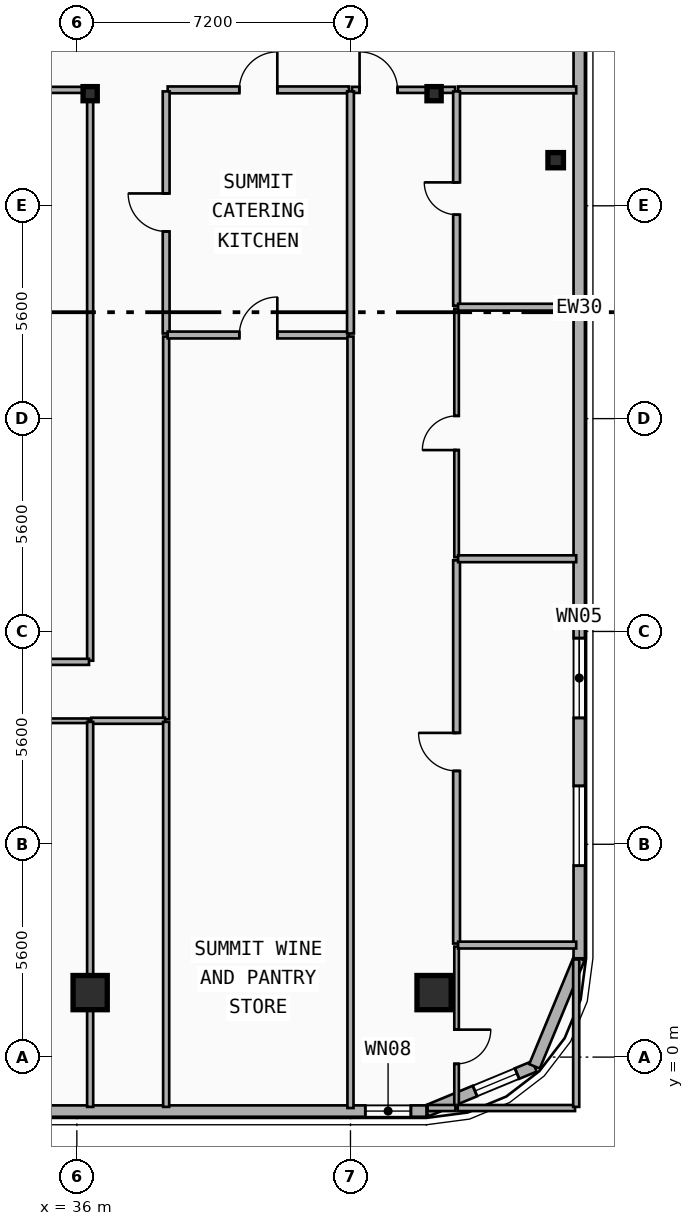
"""IFC4 building model, lengths in metres.
Left out: names, types, materials, properties, quantities, classifications, styles, units other than length and angle.
Written with IfcOpenShell. Run it as: python <this file> out.ifc"""

import sys

from ifc_helpers import new_model, si_unit, direction, frame, frame_2d, origin, origin_2d, place, context, subcontext, project, spatial, rectangle, i_section, extrude, element, fill, save


model = new_model("IFC4")
c1 = context("Model", 3, precision=1e-05, world=origin(), true_north=direction((0.0, 1.0)))
c2 = subcontext(c1, "Body", "Model", "MODEL_VIEW")
j1 = project(units=[si_unit("LENGTHUNIT", "METRE"), si_unit("PLANEANGLEUNIT", "RADIAN")], contexts=[c1])
p1 = place(None, origin())
s1 = spatial("IfcSite", under=j1, at=p1, CompositionType="ELEMENT")
p2 = place(p1, origin())
s2 = spatial("IfcBuilding", under=s1, at=p2, CompositionType="ELEMENT")
p3 = place(p2, frame((0.0, 0.0, 269.5)))
s3 = spatial("IfcBuildingStorey", under=s2, at=p3, CompositionType="ELEMENT", Elevation=269.5)
for number, where, z_axis, x_axis in (
    (1, (36.35, 25.35, 0.0), (0.0, 0.0, 1.0), (1.0, 0.0, 0.0)),
    (2, (45.4, 25.35, 0.0), (0.0, 0.0, 1.0), (1.0, 0.0, 0.0)),
):
    element("IfcColumn", number, at=place(p3, frame(where, z_axis=z_axis, x_axis=x_axis)), inside=s3, PredefinedType="COLUMN", context=c2, shape_type="SweptSolid", body=[
        extrude(i_section(OverallWidth=0.374, OverallDepth=0.372, WebThickness=0.017, FlangeThickness=0.027, FilletRadius=0.015, at=origin_2d()), origin(), (0.0, 0.0, 1.0), 3.7),
    ])
for number, where, z_axis, x_axis in (
    (3, (36.35, 1.806, 0.0), (0.0, -0.09, 0.996), (1.0, 0.0, 0.0)),
    (4, (45.4, 1.806, 0.0), (0.0, -0.09, 0.996), (1.0, 0.0, 0.0)),
):
    element("IfcColumn", number, at=place(p3, frame(where, z_axis=z_axis, x_axis=x_axis)), inside=s3, PredefinedType="COLUMN", context=c2, shape_type="SweptSolid", body=[
        extrude(rectangle(XDim=0.9, YDim=0.9, at=origin_2d()), origin(), (0.0, 0.0, 1.0), 3.715),
    ])
p4 = place(p3, frame((48.6, 23.6, 0.0), z_axis=(0.0, 0.0, 1.0), x_axis=(1.0, 0.0, 0.0)))
e5 = element("IfcColumn", 5, at=p4, inside=s3, PredefinedType="COLUMN", context=c2, shape_type="SweptSolid", body=[
    extrude(i_section(OverallWidth=0.408, OverallDepth=0.4, WebThickness=0.025, FlangeThickness=0.039, FilletRadius=0.015, at=origin_2d()), origin(), (0.0, 0.0, 1.0), 3.7),
])
p5 = place(p3, frame((48.042, -0.243, 0.0), z_axis=(0.0, 0.0, 1.0), x_axis=(-0.92389884758, -0.382636798336, 0.0)))
e6 = element("IfcWall", 6, at=p5, inside=s3, PredefinedType="SOLIDWALL", context=c2, shape_type="SweptSolid", body=[
    extrude(rectangle(XDim=3.077, YDim=0.3, at=frame_2d((1.538, 0.0))), origin(), (0.0, 0.0, 1.0), 3.42),
])
p6 = place(p5, frame((0.497, 0.0, 0.75)))
e7 = element("IfcOpeningElement", 7, at=p6, cuts=e6, PredefinedType="OPENING", context=c2, shape_type="SweptSolid", body=[
    extrude(rectangle(XDim=1.2, YDim=1.5, at=frame_2d((0.6, 0.75))), frame((0.0, 0.16, 0.0), z_axis=(0.0, -1.0, 0.0), x_axis=(1.0, 0.0, 0.0)), (0.0, 0.0, 1.0), 0.32),
])
p7 = place(p3, frame((49.22, 2.6, 0.0), z_axis=(0.0, 0.0, 1.0), x_axis=(-0.382676475685, -0.923882414032, 0.0)))
e8 = element("IfcWall", 8, at=p7, inside=s3, PredefinedType="SOLIDWALL", context=c2, shape_type="SweptSolid", body=[
    extrude(rectangle(XDim=3.077, YDim=0.3, at=frame_2d((1.539, 0.0))), origin(), (0.0, 0.0, 1.0), 3.42),
])
p8 = place(p3, frame((49.22, 36.8, 0.0), z_axis=(0.0, 0.0, 1.0), x_axis=(0.0, -1.0, 0.0)))
e9 = element("IfcWall", 9, at=p8, inside=s3, PredefinedType="SOLIDWALL", context=c2, shape_type="SweptSolid", body=[
    extrude(rectangle(XDim=34.2, YDim=0.3, at=frame_2d((17.1, 0.0))), origin(), (0.0, 0.0, 1.0), 3.42),
])
p9 = place(p8, frame((25.775, 0.0, 0.75)))
e10 = element("IfcOpeningElement", 10, at=p9, cuts=e9, PredefinedType="OPENING", context=c2, shape_type="SweptSolid", body=[
    extrude(rectangle(XDim=2.1, YDim=2.1, at=frame_2d((1.05, 1.05))), frame((0.0, 0.16, 0.0), z_axis=(0.0, -1.0, 0.0), x_axis=(1.0, 0.0, 0.0)), (0.0, 0.0, 1.0), 0.32),
])
p10 = place(p8, frame((29.664, 0.0, 0.75)))
e11 = element("IfcOpeningElement", 11, at=p10, cuts=e9, PredefinedType="OPENING", context=c2, shape_type="SweptSolid", body=[
    extrude(rectangle(XDim=2.1, YDim=2.1, at=frame_2d((1.05, 1.05))), frame((0.0, 0.16, 0.0), z_axis=(0.0, -1.0, 0.0), x_axis=(1.0, 0.0, 0.0)), (0.0, 0.0, 1.0), 0.32),
])
p11 = place(p3, frame((45.2, -1.42, 0.0), z_axis=(0.0, 0.0, 1.0), x_axis=(-1.0, 0.0, 0.0)))
e12 = element("IfcWall", 12, at=p11, inside=s3, PredefinedType="SOLIDWALL", context=c2, shape_type="SweptSolid", body=[
    extrude(rectangle(XDim=32.8, YDim=0.3, at=frame_2d((16.4, 0.0))), origin(), (0.0, 0.0, 1.0), 3.42),
])
p12 = place(p11, frame((27.919, 0.0, 0.75)))
e13 = element("IfcOpeningElement", 13, at=p12, cuts=e12, PredefinedType="OPENING", context=c2, shape_type="SweptSolid", body=[
    extrude(rectangle(XDim=2.1, YDim=2.1, at=frame_2d((1.05, 1.05))), frame((0.0, 0.16, 0.0), z_axis=(0.0, -1.0, 0.0), x_axis=(1.0, 0.0, 0.0)), (0.0, 0.0, 1.0), 0.32),
])
p13 = place(p11, frame((15.75, 0.0, 0.75)))
e14 = element("IfcOpeningElement", 14, at=p13, cuts=e12, PredefinedType="OPENING", context=c2, shape_type="SweptSolid", body=[
    extrude(rectangle(XDim=2.1, YDim=2.1, at=frame_2d((1.05, 1.05))), frame((0.0, 0.16, 0.0), z_axis=(0.0, -1.0, 0.0), x_axis=(1.0, 0.0, 0.0)), (0.0, 0.0, 1.0), 0.32),
])
p14 = place(p11, frame((0.41, 0.0, 0.68)))
e15 = element("IfcOpeningElement", 15, at=p14, cuts=e12, PredefinedType="OPENING", context=c2, shape_type="SweptSolid", body=[
    extrude(rectangle(XDim=1.2, YDim=1.5, at=frame_2d((0.6, 0.75))), frame((0.0, 0.16, 0.0), z_axis=(0.0, -1.0, 0.0), x_axis=(1.0, 0.0, 0.0)), (0.0, 0.0, 1.0), 0.32),
])
p15 = place(p3, frame((38.39, 25.45, 0.0), z_axis=(0.0, 0.0, 1.0), x_axis=(1.0, 0.0, 0.0)))
e16 = element("IfcWall", 16, at=p15, inside=s3, PredefinedType="PLUMBINGWALL", context=c2, shape_type="SweptSolid", body=[
    extrude(rectangle(XDim=4.77, YDim=0.18, at=frame_2d((2.385, 0.0))), origin(), (0.0, 0.0, 1.0), 3.42),
])
p16 = place(p15, frame((1.885, 0.0, 0.0)))
e17 = element("IfcOpeningElement", 17, at=p16, cuts=e16, PredefinedType="OPENING", context=c2, shape_type="SweptSolid", body=[
    extrude(rectangle(XDim=1.0, YDim=2.15, at=frame_2d((0.5, 1.075))), frame((0.0, 0.1, 0.0), z_axis=(0.0, -1.0, 0.0), x_axis=(1.0, 0.0, 0.0)), (0.0, 0.0, 1.0), 0.2),
])
p17 = place(p3, frame((43.24, 25.45, 0.0), z_axis=(0.0, 0.0, 1.0), x_axis=(1.0, 0.0, 0.0)))
e18 = element("IfcWall", 18, at=p17, inside=s3, PredefinedType="PARTITIONING", context=c2, shape_type="SweptSolid", body=[
    extrude(rectangle(XDim=2.712, YDim=0.16, at=frame_2d((1.356, 0.0))), origin(), (0.0, 0.0, 1.0), 2.7),
])
p18 = place(p17, frame((0.2, 0.0, 0.0)))
e19 = element("IfcOpeningElement", 19, at=p18, cuts=e18, PredefinedType="OPENING", context=c2, shape_type="SweptSolid", body=[
    extrude(rectangle(XDim=1.0, YDim=2.15, at=frame_2d((0.5, 1.075))), frame((0.0, 0.09, 0.0), z_axis=(0.0, -1.0, 0.0), x_axis=(1.0, 0.0, 0.0)), (0.0, 0.0, 1.0), 0.18),
])
p19 = place(p3, frame((46.032, 25.45, 0.0), z_axis=(0.0, 0.0, 1.0), x_axis=(1.0, 0.0, 0.0)))
e20 = element("IfcWall", 20, at=p19, inside=s3, PredefinedType="PLUMBINGWALL", context=c2, shape_type="SweptSolid", body=[
    extrude(rectangle(XDim=3.108, YDim=0.18, at=frame_2d((1.554, 0.0))), origin(), (0.0, 0.0, 1.0), 3.42),
])
p20 = place(p3, frame((38.35, 19.04, 0.0), z_axis=(0.0, 0.0, 1.0), x_axis=(0.0, 1.0, 0.0)))
e21 = element("IfcWall", 21, at=p20, inside=s3, PredefinedType="PLUMBINGWALL", context=c2, shape_type="SweptSolid", body=[
    extrude(rectangle(XDim=6.37, YDim=0.18, at=frame_2d((3.185, 0.0))), origin(), (0.0, 0.0, 1.0), 2.96),
])
p21 = place(p20, frame((2.685, 0.0, 0.0)))
e22 = element("IfcOpeningElement", 22, at=p21, cuts=e21, PredefinedType="OPENING", context=c2, shape_type="SweptSolid", body=[
    extrude(rectangle(XDim=1.0, YDim=2.15, at=frame_2d((0.5, 1.075))), frame((0.0, 0.1, 0.0), z_axis=(0.0, -1.0, 0.0), x_axis=(1.0, 0.0, 0.0)), (0.0, 0.0, 1.0), 0.2),
])
p22 = place(p3, frame((38.35, 8.89, 0.0), z_axis=(0.0, 0.0, 1.0), x_axis=(0.0, 1.0, 0.0)))
e23 = element("IfcWall", 23, at=p22, inside=s3, PredefinedType="PARTITIONING", context=c2, shape_type="SweptSolid", body=[
    extrude(rectangle(XDim=10.07, YDim=0.16, at=frame_2d((5.035, 0.0))), origin(), (0.0, 0.0, 1.0), 2.96),
])
p23 = place(p3, frame((20.49, 8.85, 0.0), z_axis=(0.0, 0.0, 1.0), x_axis=(1.0, 0.0, 0.0)))
e24 = element("IfcWall", 24, at=p23, inside=s3, PredefinedType="PARTITIONING", context=c2, shape_type="SweptSolid", body=[
    extrude(rectangle(XDim=15.82, YDim=0.12, at=frame_2d((7.91, 0.0))), origin(), (0.0, 0.0, 1.0), 2.7),
])
p24 = place(p23, frame((7.46, 0.0, 0.0)))
e25 = element("IfcOpeningElement", 25, at=p24, cuts=e24, PredefinedType="OPENING", context=c2, shape_type="SweptSolid", body=[
    extrude(rectangle(XDim=0.9, YDim=2.1, at=frame_2d((0.45, 1.05))), frame((0.0, 0.07, 0.0), z_axis=(0.0, -1.0, 0.0), x_axis=(1.0, 0.0, 0.0)), (0.0, 0.0, 1.0), 0.14),
])
p25 = place(p3, frame((38.39, 19.0, 0.0), z_axis=(0.0, 0.0, 1.0), x_axis=(1.0, 0.0, 0.0)))
e26 = element("IfcWall", 26, at=p25, inside=s3, PredefinedType="PLUMBINGWALL", context=c2, shape_type="SweptSolid", body=[
    extrude(rectangle(XDim=4.77, YDim=0.18, at=frame_2d((2.385, 0.0))), origin(), (0.0, 0.0, 1.0), 3.09),
])
p26 = place(p25, frame((1.885, 0.0, 0.0)))
e27 = element("IfcOpeningElement", 27, at=p26, cuts=e26, PredefinedType="OPENING", context=c2, shape_type="SweptSolid", body=[
    extrude(rectangle(XDim=1.0, YDim=2.15, at=frame_2d((0.5, 1.075))), frame((0.0, 0.1, 0.0), z_axis=(0.0, -1.0, 0.0), x_axis=(1.0, 0.0, 0.0)), (0.0, 0.0, 1.0), 0.2),
])
p27 = place(p3, frame((43.2, 19.04, 0.0), z_axis=(0.0, 0.0, 1.0), x_axis=(0.0, 1.0, 0.0)))
e28 = element("IfcWall", 28, at=p27, inside=s3, PredefinedType="PLUMBINGWALL", context=c2, shape_type="SweptSolid", body=[
    extrude(rectangle(XDim=6.37, YDim=0.18, at=frame_2d((3.185, 0.0))), origin(), (0.0, 0.0, 1.0), 2.96),
])
p28 = place(p3, frame((43.2, -1.34, 0.0), z_axis=(0.0, 0.0, 1.0), x_axis=(0.0, 1.0, 0.0)))
e29 = element("IfcWall", 29, at=p28, inside=s3, PredefinedType="PARTITIONING", context=c2, shape_type="SweptSolid", body=[
    extrude(rectangle(XDim=20.3, YDim=0.16, at=frame_2d((10.15, 0.0))), origin(), (0.0, 0.0, 1.0), 2.96),
])
p29 = place(p3, frame((45.992, 2.908, 0.0), z_axis=(0.0, 0.0, 1.0), x_axis=(0.0, -1.0, 0.0)))
e30 = element("IfcWall", 30, at=p29, inside=s3, PredefinedType="PARTITIONING", context=c2, shape_type="SweptSolid", body=[
    extrude(rectangle(XDim=4.248, YDim=0.12, at=frame_2d((2.124, 0.0))), origin(), (0.0, 0.0, 1.0), 2.7),
])
p30 = place(p29, frame((2.185, 0.0, 0.0)))
e31 = element("IfcOpeningElement", 31, at=p30, cuts=e30, PredefinedType="OPENING", context=c2, shape_type="SweptSolid", body=[
    extrude(rectangle(XDim=0.9, YDim=2.1, at=frame_2d((0.45, 1.05))), frame((0.0, 0.07, 0.0), z_axis=(0.0, -1.0, 0.0), x_axis=(1.0, 0.0, 0.0)), (0.0, 0.0, 1.0), 0.14),
])
p31 = place(p3, frame((45.992, 2.988, 0.0), z_axis=(0.0, 0.0, 1.0), x_axis=(0.0, 1.0, 0.0)))
e32 = element("IfcWall", 32, at=p31, inside=s3, PredefinedType="PLUMBINGWALL", context=c2, shape_type="SweptSolid", body=[
    extrude(rectangle(XDim=10.085, YDim=0.18, at=frame_2d((5.042, 0.0))), origin(), (0.0, 0.0, 1.0), 2.7),
])
p32 = place(p31, frame((4.542, 0.0, 0.0)))
e33 = element("IfcOpeningElement", 33, at=p32, cuts=e32, PredefinedType="OPENING", context=c2, shape_type="SweptSolid", body=[
    extrude(rectangle(XDim=1.0, YDim=2.15, at=frame_2d((0.5, 1.075))), frame((0.0, 0.1, 0.0), z_axis=(0.0, -1.0, 0.0), x_axis=(1.0, 0.0, 0.0)), (0.0, 0.0, 1.0), 0.2),
])
p33 = place(p3, frame((45.992, 13.153, 0.0), z_axis=(0.0, 0.0, 1.0), x_axis=(0.0, 1.0, 0.0)))
e34 = element("IfcWall", 34, at=p33, inside=s3, PredefinedType="PARTITIONING", context=c2, shape_type="SweptSolid", body=[
    extrude(rectangle(XDim=6.539, YDim=0.12, at=frame_2d((3.27, 0.0))), origin(), (0.0, 0.0, 1.0), 2.7),
])
p34 = place(p33, frame((2.82, 0.0, 0.0)))
e35 = element("IfcOpeningElement", 35, at=p34, cuts=e34, PredefinedType="OPENING", context=c2, shape_type="SweptSolid", body=[
    extrude(rectangle(XDim=0.9, YDim=2.1, at=frame_2d((0.45, 1.05))), frame((0.0, 0.07, 0.0), z_axis=(0.0, -1.0, 0.0), x_axis=(1.0, 0.0, 0.0)), (0.0, 0.0, 1.0), 0.14),
])
p35 = place(p3, frame((45.992, 19.772, 0.0), z_axis=(0.0, 0.0, 1.0), x_axis=(0.0, 1.0, 0.0)))
e36 = element("IfcWall", 36, at=p35, inside=s3, PredefinedType="PLUMBINGWALL", context=c2, shape_type="SweptSolid", body=[
    extrude(rectangle(XDim=5.638, YDim=0.18, at=frame_2d((2.819, 0.0))), origin(), (0.0, 0.0, 1.0), 2.7),
])
p36 = place(p35, frame((2.394, 0.0, 0.0)))
e37 = element("IfcOpeningElement", 37, at=p36, cuts=e36, PredefinedType="OPENING", context=c2, shape_type="SweptSolid", body=[
    extrude(rectangle(XDim=0.85, YDim=2.1, at=frame_2d((0.425, 1.05))), frame((0.0, 0.1, 0.0), z_axis=(0.0, -1.0, 0.0), x_axis=(1.0, 0.0, 0.0)), (0.0, 0.0, 1.0), 0.2),
])
for number, where, z_axis, x_axis in (
    (38, (46.032, 2.948, 0.0), (0.0, 0.0, 1.0), (1.0, 0.0, 0.0)),
    (39, (46.032, 13.113, 0.0), (0.0, 0.0, 1.0), (1.0, 0.0, 0.0)),
    (40, (46.032, 19.732, 0.0), (0.0, 0.0, 1.0), (1.0, 0.0, 0.0)),
):
    element("IfcWall", number, at=place(p3, frame(where, z_axis=z_axis, x_axis=x_axis)), inside=s3, PredefinedType="PLUMBINGWALL", context=c2, shape_type="SweptSolid", body=[
        extrude(rectangle(XDim=3.108, YDim=0.18, at=frame_2d((1.554, 0.0))), origin(), (0.0, 0.0, 1.0), 3.42),
    ])
p37 = place(p3, frame((20.48, 25.45, 0.0), z_axis=(0.0, 0.0, 1.0), x_axis=(1.0, 0.0, 0.0)))
e41 = element("IfcWall", 41, at=p37, inside=s3, PredefinedType="PARTITIONING", context=c2, shape_type="SweptSolid", body=[
    extrude(rectangle(XDim=15.84, YDim=0.16, at=frame_2d((7.92, 0.0))), origin(), (0.0, 0.0, 1.0), 2.7),
])
p38 = place(p3, frame((36.38, 8.85, 0.0), z_axis=(0.0, 0.0, 1.0), x_axis=(1.0, 0.0, 0.0)))
e42 = element("IfcWall", 42, at=p38, inside=s3, PredefinedType="PARTITIONING", context=c2, shape_type="SweptSolid", body=[
    extrude(rectangle(XDim=1.94, YDim=0.16, at=frame_2d((0.97, 0.0))), origin(), (0.0, 0.0, 1.0), 2.7),
])
p39 = place(p3, frame((36.35, 10.43, 0.0), z_axis=(0.0, 0.0, 1.0), x_axis=(0.0, 1.0, 0.0)))
e43 = element("IfcWall", 43, at=p39, inside=s3, PredefinedType="PARTITIONING", context=c2, shape_type="SweptSolid", body=[
    extrude(rectangle(XDim=14.99, YDim=0.16, at=frame_2d((7.495, 0.0))), origin(), (0.0, 0.0, 1.0), 2.7),
])
p40 = place(p3, frame((34.48, 10.4, 0.0), z_axis=(0.0, 0.0, 1.0), x_axis=(1.0, 0.0, 0.0)))
e44 = element("IfcWall", 44, at=p40, inside=s3, PredefinedType="PARTITIONING", context=c2, shape_type="SweptSolid", body=[
    extrude(rectangle(XDim=1.84, YDim=0.16, at=frame_2d((0.92, 0.0))), origin(), (0.0, 0.0, 1.0), 2.7),
])
p41 = place(p3, frame((36.35, -1.31, 0.0), z_axis=(0.0, 0.0, 1.0), x_axis=(0.0, 1.0, 0.0)))
e45 = element("IfcWall", 45, at=p41, inside=s3, PredefinedType="PARTITIONING", context=c2, shape_type="SweptSolid", body=[
    extrude(rectangle(XDim=10.13, YDim=0.16, at=frame_2d((5.065, 0.0))), origin(), (0.0, 0.0, 1.0), 2.7),
])
p42 = place(p3, frame((38.35, -1.31, 0.0), z_axis=(0.0, 0.0, 1.0), x_axis=(0.0, 1.0, 0.0)))
e46 = element("IfcWall", 46, at=p42, inside=s3, PredefinedType="PARTITIONING", context=c2, shape_type="SweptSolid", body=[
    extrude(rectangle(XDim=10.13, YDim=0.16, at=frame_2d((5.065, 0.0))), origin(), (0.0, 0.0, 1.0), 2.96),
])
p43 = place(p3, frame((45.23, -1.34, 0.0), z_axis=(0.0, 0.0, 1.0), x_axis=(1.0, 0.0, 0.0)))
e47 = element("IfcWall", 47, at=p43, inside=s3, PredefinedType="PARTITIONING", context=c2, shape_type="SweptSolid", body=[
    extrude(rectangle(XDim=0.732, YDim=0.16, at=frame_2d((0.366, 0.0))), origin(), (0.0, 0.0, 1.0), 3.42),
])
p44 = place(p3, frame((46.022, -1.34, 0.0), z_axis=(0.0, 0.0, 1.0), x_axis=(1.0, 0.0, 0.0)))
e48 = element("IfcWall", 48, at=p44, inside=s3, PredefinedType="PARTITIONING", context=c2, shape_type="SweptSolid", body=[
    extrude(rectangle(XDim=3.088, YDim=0.16, at=frame_2d((1.544, 0.0))), origin(), (0.0, 0.0, 1.0), 3.42),
])
p45 = place(p3, frame((49.14, -1.31, 0.0), z_axis=(0.0, 0.0, 1.0), x_axis=(0.0, 1.0, 0.0)))
e49 = element("IfcWall", 49, at=p45, inside=s3, PredefinedType="PARTITIONING", context=c2, shape_type="SweptSolid", body=[
    extrude(rectangle(XDim=3.88, YDim=0.16, at=frame_2d((1.94, 0.0))), origin(), (0.0, 0.0, 1.0), 3.42),
])
p46 = place(p9, origin())
e50 = element("IfcWindow", 50, at=p46, inside=s3, PartitioningType="SINGLE_PANEL", PredefinedType="WINDOW", context=c2, shape_type="SweptSolid", body=[
    extrude(rectangle(XDim=2.1, YDim=2.1, at=frame_2d((1.05, 1.05))), frame((0.0, 0.03, 0.0), z_axis=(0.0, -1.0, 0.0), x_axis=(1.0, 0.0, 0.0)), (0.0, 0.0, 1.0), 0.06),
])
fill(e10, e50)
p47 = place(p10, origin())
e51 = element("IfcWindow", 51, at=p47, inside=s3, PartitioningType="SINGLE_PANEL", PredefinedType="WINDOW", context=c2, shape_type="SweptSolid", body=[
    extrude(rectangle(XDim=2.1, YDim=2.1, at=frame_2d((1.05, 1.05))), frame((0.0, 0.03, 0.0), z_axis=(0.0, -1.0, 0.0), x_axis=(1.0, 0.0, 0.0)), (0.0, 0.0, 1.0), 0.06),
])
fill(e11, e51)
p48 = place(p14, origin())
e52 = element("IfcWindow", 52, at=p48, inside=s3, PartitioningType="SINGLE_PANEL", PredefinedType="WINDOW", context=c2, shape_type="SweptSolid", body=[
    extrude(rectangle(XDim=1.2, YDim=1.5, at=frame_2d((0.6, 0.75))), frame((0.0, 0.03, 0.0), z_axis=(0.0, -1.0, 0.0), x_axis=(1.0, 0.0, 0.0)), (0.0, 0.0, 1.0), 0.06),
])
fill(e15, e52)
p49 = place(p6, origin())
e53 = element("IfcWindow", 53, at=p49, inside=s3, PartitioningType="SINGLE_PANEL", PredefinedType="WINDOW", context=c2, shape_type="SweptSolid", body=[
    extrude(rectangle(XDim=1.2, YDim=1.5, at=frame_2d((0.6, 0.75))), frame((0.0, 0.03, 0.0), z_axis=(0.0, -1.0, 0.0), x_axis=(1.0, 0.0, 0.0)), (0.0, 0.0, 1.0), 0.06),
])
fill(e7, e53)
p50 = place(p16, origin())
e54 = element("IfcDoor", 54, at=p50, inside=s3, OperationType="SINGLE_SWING_RIGHT", PredefinedType="DOOR", context=c2, shape_type="SweptSolid", body=[
    extrude(rectangle(XDim=1.0, YDim=2.15, at=frame_2d((0.5, 1.075))), frame((0.0, 0.025, 0.0), z_axis=(0.0, -1.0, 0.0), x_axis=(1.0, 0.0, 0.0)), (0.0, 0.0, 1.0), 0.05),
])
fill(e17, e54)
p51 = place(p18, origin())
e55 = element("IfcDoor", 55, at=p51, inside=s3, OperationType="SINGLE_SWING_LEFT", PredefinedType="DOOR", context=c2, shape_type="SweptSolid", body=[
    extrude(rectangle(XDim=1.0, YDim=2.15, at=frame_2d((0.5, 1.075))), frame((0.0, 0.025, 0.0), z_axis=(0.0, -1.0, 0.0), x_axis=(1.0, 0.0, 0.0)), (0.0, 0.0, 1.0), 0.05),
])
fill(e19, e55)
p52 = place(p21, origin())
e56 = element("IfcDoor", 56, at=p52, inside=s3, OperationType="SINGLE_SWING_RIGHT", PredefinedType="DOOR", context=c2, shape_type="SweptSolid", body=[
    extrude(rectangle(XDim=1.0, YDim=2.15, at=frame_2d((0.5, 1.075))), frame((0.0, 0.025, 0.0), z_axis=(0.0, -1.0, 0.0), x_axis=(1.0, 0.0, 0.0)), (0.0, 0.0, 1.0), 0.05),
])
fill(e22, e56)
p53 = place(p26, origin())
e57 = element("IfcDoor", 57, at=p53, inside=s3, OperationType="SINGLE_SWING_RIGHT", PredefinedType="DOOR", context=c2, shape_type="SweptSolid", body=[
    extrude(rectangle(XDim=1.0, YDim=2.15, at=frame_2d((0.5, 1.075))), frame((0.0, 0.025, 0.0), z_axis=(0.0, -1.0, 0.0), x_axis=(1.0, 0.0, 0.0)), (0.0, 0.0, 1.0), 0.05),
])
fill(e27, e57)
p54 = place(p30, origin())
e58 = element("IfcDoor", 58, at=p54, inside=s3, OperationType="SINGLE_SWING_LEFT", PredefinedType="DOOR", context=c2, shape_type="SweptSolid", body=[
    extrude(rectangle(XDim=0.9, YDim=2.1, at=frame_2d((0.45, 1.05))), frame((0.0, 0.025, 0.0), z_axis=(0.0, -1.0, 0.0), x_axis=(1.0, 0.0, 0.0)), (0.0, 0.0, 1.0), 0.05),
])
fill(e31, e58)
p55 = place(p32, origin())
e59 = element("IfcDoor", 59, at=p55, inside=s3, OperationType="SINGLE_SWING_RIGHT", PredefinedType="DOOR", context=c2, shape_type="SweptSolid", body=[
    extrude(rectangle(XDim=1.0, YDim=2.15, at=frame_2d((0.5, 1.075))), frame((0.0, 0.025, 0.0), z_axis=(0.0, -1.0, 0.0), x_axis=(1.0, 0.0, 0.0)), (0.0, 0.0, 1.0), 0.05),
])
fill(e33, e59)
p56 = place(p34, origin())
e60 = element("IfcDoor", 60, at=p56, inside=s3, OperationType="SINGLE_SWING_LEFT", PredefinedType="DOOR", context=c2, shape_type="SweptSolid", body=[
    extrude(rectangle(XDim=0.9, YDim=2.1, at=frame_2d((0.45, 1.05))), frame((0.0, 0.025, 0.0), z_axis=(0.0, -1.0, 0.0), x_axis=(1.0, 0.0, 0.0)), (0.0, 0.0, 1.0), 0.05),
])
fill(e35, e60)
p57 = place(p36, origin())
e61 = element("IfcDoor", 61, at=p57, inside=s3, OperationType="SINGLE_SWING_RIGHT", PredefinedType="DOOR", context=c2, shape_type="SweptSolid", body=[
    extrude(rectangle(XDim=0.85, YDim=2.1, at=frame_2d((0.425, 1.05))), frame((0.0, 0.025, 0.0), z_axis=(0.0, -1.0, 0.0), x_axis=(1.0, 0.0, 0.0)), (0.0, 0.0, 1.0), 0.05),
])
fill(e37, e61)
save(model, sys.argv[1])
